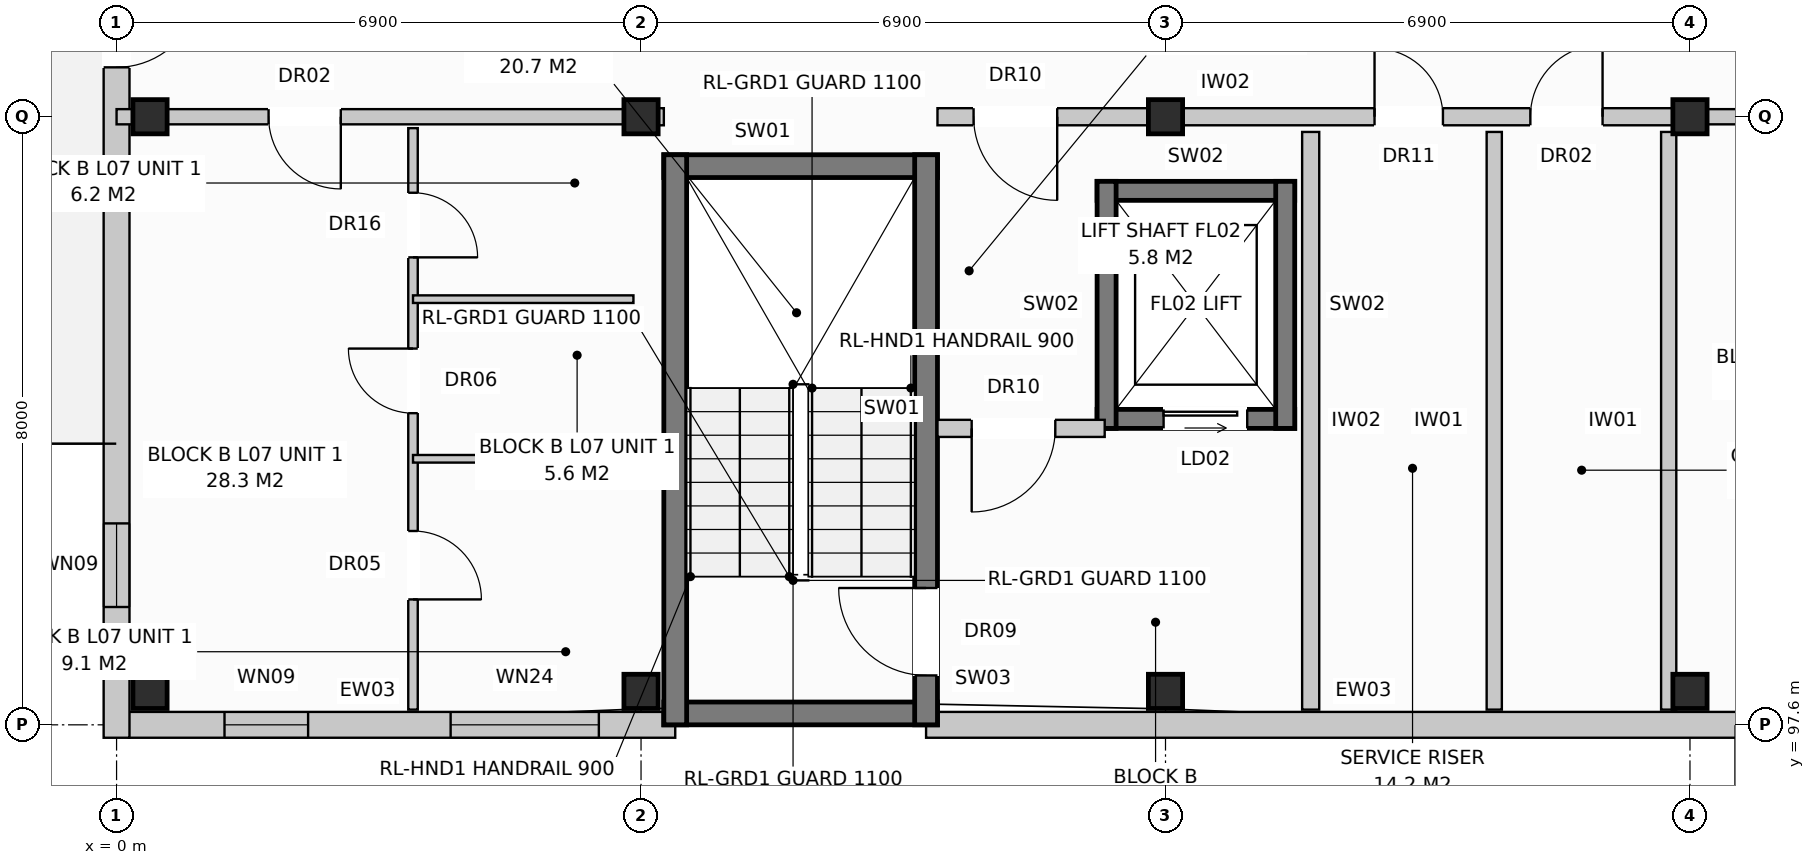
"""IFC4 building model, lengths in metres.
Left out: names, types, materials, properties, quantities, classifications, styles, units other than length and angle.
Written with IfcOpenShell. Run it as: python <this file> out.ifc"""

import sys

from ifc_helpers import new_model, si_unit, direction, frame, frame_2d, origin, origin_with_axes, origin_2d, place, context, subcontext, project, spatial, rectangle, extrude, element, fill, save


model = new_model("IFC4")
c1 = context("Model", 3, precision=1e-05, world=origin(), true_north=direction((0.0, 1.0)))
c2 = subcontext(c1, "Body", "Model", "MODEL_VIEW")
j1 = project(units=[si_unit("LENGTHUNIT", "METRE"), si_unit("PLANEANGLEUNIT", "RADIAN")], contexts=[c1])
p1 = place(None, origin())
s1 = spatial("IfcSite", under=j1, at=p1, CompositionType="ELEMENT")
p2 = place(p1, origin())
s2 = spatial("IfcBuilding", under=s1, at=p2, CompositionType="ELEMENT")
p3 = place(p2, frame((0.0, 0.0, 24.0)))
s3 = spatial("IfcBuildingStorey", under=s2, at=p3, CompositionType="ELEMENT", Elevation=24.0)
for number, where, z_axis, x_axis in (
    (1, (0.44, 98.04, 0.0), (0.0, 0.0, 1.0), (1.0, 0.0, 0.0)),
    (2, (0.44, 105.6, 0.0), (0.0, 0.0, 1.0), (1.0, 0.0, 0.0)),
    (3, (6.9, 98.04, 0.0), (0.0, 0.0, 1.0), (1.0, 0.0, 0.0)),
    (4, (6.9, 105.6, 0.0), (0.0, 0.0, 1.0), (1.0, 0.0, 0.0)),
    (5, (13.8, 98.04, 0.0), (0.0, 0.0, 1.0), (1.0, 0.0, 0.0)),
    (6, (13.8, 105.6, 0.0), (0.0, 0.0, 1.0), (1.0, 0.0, 0.0)),
    (7, (20.7, 98.04, 0.0), (0.0, 0.0, 1.0), (1.0, 0.0, 0.0)),
    (8, (20.7, 105.6, 0.0), (0.0, 0.0, 1.0), (1.0, 0.0, 0.0)),
):
    element("IfcColumn", number, at=place(p3, frame(where, z_axis=z_axis, x_axis=x_axis)), inside=s3, PredefinedType="COLUMN", context=c2, shape_type="SweptSolid", body=[
        extrude(rectangle(XDim=0.45, YDim=0.45, at=origin_2d()), origin(), (0.0, 0.0, 1.0), 3.2),
    ])
p4 = place(p3, frame((0.16, 97.6, 0.0), z_axis=(0.0, 0.0, 1.0), x_axis=(1.0, 0.0, 0.0)))
e9 = element("IfcWall", 9, at=p4, inside=s3, PredefinedType="STANDARD", context=c2, shape_type="SweptSolid", body=[
    extrude(rectangle(XDim=7.19, YDim=0.34, at=frame_2d((3.595, 0.0))), origin(), (0.0, 0.0, 1.0), 2.95),
])
p5 = place(p4, frame((1.26, 0.0, 0.72)))
e10 = element("IfcOpeningElement", 10, at=p5, cuts=e9, PredefinedType="OPENING", context=c2, shape_type="SweptSolid", body=[
    extrude(rectangle(XDim=1.1, YDim=1.5, at=frame_2d((0.55, 0.75))), frame((0.0, 0.182, 0.0), z_axis=(0.0, -1.0, 0.0), x_axis=(1.0, 0.0, 0.0)), (0.0, 0.0, 1.0), 0.364),
])
p6 = place(p4, frame((4.235, 0.0, 0.8)))
e11 = element("IfcOpeningElement", 11, at=p6, cuts=e9, PredefinedType="OPENING", context=c2, shape_type="SweptSolid", body=[
    extrude(rectangle(XDim=1.95, YDim=1.65, at=frame_2d((0.975, 0.825))), frame((0.0, 0.182, 0.0), z_axis=(0.0, -1.0, 0.0), x_axis=(1.0, 0.0, 0.0)), (0.0, 0.0, 1.0), 0.364),
])
p7 = place(p3, frame((10.65, 97.6, 0.0), z_axis=(0.0, 0.0, 1.0), x_axis=(1.0, 0.0, 0.0)))
e12 = element("IfcWall", 12, at=p7, inside=s3, PredefinedType="STANDARD", context=c2, shape_type="SweptSolid", body=[
    extrude(rectangle(XDim=17.4, YDim=0.34, at=frame_2d((8.7, 0.0))), origin(), (0.0, 0.0, 1.0), 2.95),
])
p8 = place(p7, frame((11.82, 0.0, 0.0)))
e13 = element("IfcOpeningElement", 13, at=p8, cuts=e12, PredefinedType="OPENING", context=c2, shape_type="SweptSolid", body=[
    extrude(rectangle(XDim=1.05, YDim=2.12, at=frame_2d((0.525, 1.06))), frame((0.0, 0.182, 0.0), z_axis=(0.0, -1.0, 0.0), x_axis=(1.0, 0.0, 0.0)), (0.0, 0.0, 1.0), 0.364),
])
p9 = place(p7, frame((14.97, 0.0, 0.72)))
e14 = element("IfcOpeningElement", 14, at=p9, cuts=e12, PredefinedType="OPENING", context=c2, shape_type="SweptSolid", body=[
    extrude(rectangle(XDim=1.1, YDim=1.5, at=frame_2d((0.55, 0.75))), frame((0.0, 0.182, 0.0), z_axis=(0.0, -1.0, 0.0), x_axis=(1.0, 0.0, 0.0)), (0.0, 0.0, 1.0), 0.364),
])
p10 = place(p3, frame((0.0, 97.43, 0.0), z_axis=(0.0, 0.0, 1.0), x_axis=(0.0, 1.0, 0.0)))
e15 = element("IfcWall", 15, at=p10, inside=s3, PredefinedType="STANDARD", context=c2, shape_type="SweptSolid", body=[
    extrude(rectangle(XDim=18.74, YDim=0.34, at=frame_2d((9.37, 0.0))), origin(), (0.0, 0.0, 1.0), 2.95),
])
p11 = place(p10, frame((8.82, 0.0, 0.0)))
e16 = element("IfcOpeningElement", 16, at=p11, cuts=e15, PredefinedType="OPENING", context=c2, shape_type="SweptSolid", body=[
    extrude(rectangle(XDim=1.1, YDim=2.1, at=frame_2d((0.55, 1.05))), frame((0.0, 0.182, 0.0), z_axis=(0.0, -1.0, 0.0), x_axis=(1.0, 0.0, 0.0)), (0.0, 0.0, 1.0), 0.364),
])
p12 = place(p10, frame((1.72, 0.0, 0.72)))
e17 = element("IfcOpeningElement", 17, at=p12, cuts=e15, PredefinedType="OPENING", context=c2, shape_type="SweptSolid", body=[
    extrude(rectangle(XDim=1.1, YDim=1.5, at=frame_2d((0.55, 0.75))), frame((0.0, 0.182, 0.0), z_axis=(0.0, -1.0, 0.0), x_axis=(1.0, 0.0, 0.0)), (0.0, 0.0, 1.0), 0.364),
])
p13 = place(p10, frame((15.92, 0.0, 0.72)))
e18 = element("IfcOpeningElement", 18, at=p13, cuts=e15, PredefinedType="OPENING", context=c2, shape_type="SweptSolid", body=[
    extrude(rectangle(XDim=1.1, YDim=1.5, at=frame_2d((0.55, 0.75))), frame((0.0, 0.182, 0.0), z_axis=(0.0, -1.0, 0.0), x_axis=(1.0, 0.0, 0.0)), (0.0, 0.0, 1.0), 0.364),
])
for number, where, z_axis, x_axis in (
    (19, (7.2, 97.75, 0.0), (0.0, 0.0, 1.0), (1.0, 0.0, 0.0)),
    (20, (7.2, 104.95, 0.0), (0.0, 0.0, 1.0), (1.0, 0.0, 0.0)),
):
    element("IfcWall", number, at=place(p3, frame(where, z_axis=z_axis, x_axis=x_axis)), inside=s3, PredefinedType="SHEAR", context=c2, shape_type="SweptSolid", body=[
        extrude(rectangle(XDim=3.6, YDim=0.3, at=frame_2d((1.8, 0.0))), origin(), (0.0, 0.0, 1.0), 2.95),
    ])
p14 = place(p3, frame((7.35, 97.6, 0.0), z_axis=(0.0, 0.0, 1.0), x_axis=(0.0, 1.0, 0.0)))
e21 = element("IfcWall", 21, at=p14, inside=s3, PredefinedType="SHEAR", context=c2, shape_type="SweptSolid", body=[
    extrude(rectangle(XDim=7.5, YDim=0.3, at=frame_2d((3.75, 0.0))), origin(), (0.0, 0.0, 1.0), 2.95),
])
p15 = place(p3, frame((10.65, 97.6, 0.0), z_axis=(0.0, 0.0, 1.0), x_axis=(0.0, 1.0, 0.0)))
e22 = element("IfcWall", 22, at=p15, inside=s3, PredefinedType="SHEAR", context=c2, shape_type="SweptSolid", body=[
    extrude(rectangle(XDim=7.5, YDim=0.3, at=frame_2d((3.75, 0.0))), origin(), (0.0, 0.0, 1.0), 2.95),
])
p16 = place(p15, frame((0.65, 0.0, 0.0)))
e23 = element("IfcOpeningElement", 23, at=p16, cuts=e22, PredefinedType="OPENING", context=c2, shape_type="SweptSolid", body=[
    extrude(rectangle(XDim=1.15, YDim=2.15, at=frame_2d((0.575, 1.075))), frame((0.0, 0.162, 0.0), z_axis=(0.0, -1.0, 0.0), x_axis=(1.0, 0.0, 0.0)), (0.0, 0.0, 1.0), 0.324),
])
p17 = place(p3, frame((12.9, 101.625, 0.0), z_axis=(0.0, 0.0, 1.0), x_axis=(1.0, 0.0, 0.0)))
e24 = element("IfcWall", 24, at=p17, inside=s3, PredefinedType="SHEAR", context=c2, shape_type="SweptSolid", body=[
    extrude(rectangle(XDim=2.6, YDim=0.25, at=frame_2d((1.3, 0.0))), origin(), (0.0, 0.0, 1.0), 2.95),
])
p18 = place(p17, frame((0.875, 0.0, 0.0)))
e25 = element("IfcOpeningElement", 25, at=p18, cuts=e24, PredefinedType="OPENING", context=c2, shape_type="SweptSolid", body=[
    extrude(rectangle(XDim=1.1, YDim=2.1, at=frame_2d((0.55, 1.05))), frame((0.0, 0.137, 0.0), z_axis=(0.0, -1.0, 0.0), x_axis=(1.0, 0.0, 0.0)), (0.0, 0.0, 1.0), 0.274),
])
p19 = place(p3, frame((12.9, 104.625, 0.0), z_axis=(0.0, 0.0, 1.0), x_axis=(1.0, 0.0, 0.0)))
e26 = element("IfcWall", 26, at=p19, inside=s3, PredefinedType="SHEAR", context=c2, shape_type="SweptSolid", body=[
    extrude(rectangle(XDim=2.6, YDim=0.25, at=frame_2d((1.3, 0.0))), origin(), (0.0, 0.0, 1.0), 2.95),
])
for number, where, z_axis, x_axis in (
    (27, (13.025, 101.5, 0.0), (0.0, 0.0, 1.0), (0.0, 1.0, 0.0)),
    (28, (15.375, 101.5, 0.0), (0.0, 0.0, 1.0), (0.0, 1.0, 0.0)),
):
    element("IfcWall", number, at=place(p3, frame(where, z_axis=z_axis, x_axis=x_axis)), inside=s3, PredefinedType="SHEAR", context=c2, shape_type="SweptSolid", body=[
        extrude(rectangle(XDim=3.25, YDim=0.25, at=frame_2d((1.625, 0.0))), origin(), (0.0, 0.0, 1.0), 2.95),
    ])
p20 = place(p3, frame((15.71, 97.8, 0.0), z_axis=(0.0, 0.0, 1.0), x_axis=(0.0, 1.0, 0.0)))
e29 = element("IfcWall", 29, at=p20, inside=s3, PredefinedType="PARTITIONING", context=c2, shape_type="SweptSolid", body=[
    extrude(rectangle(XDim=7.6, YDim=0.225, at=frame_2d((3.8, 0.0))), origin(), (0.0, 0.0, 1.0), 2.59),
])
p21 = place(p3, frame((10.8, 101.5, 0.0), z_axis=(0.0, 0.0, 1.0), x_axis=(1.0, 0.0, 0.0)))
e30 = element("IfcWall", 30, at=p21, inside=s3, PredefinedType="PARTITIONING", context=c2, shape_type="SweptSolid", body=[
    extrude(rectangle(XDim=2.2, YDim=0.225, at=frame_2d((1.1, 0.0))), origin(), (0.0, 0.0, 1.0), 2.95),
])
p22 = place(p21, frame((0.45, 0.0, 0.0)))
e31 = element("IfcOpeningElement", 31, at=p22, cuts=e30, PredefinedType="OPENING", context=c2, shape_type="SweptSolid", body=[
    extrude(rectangle(XDim=1.1, YDim=2.15, at=frame_2d((0.55, 1.075))), frame((0.0, 0.125, 0.0), z_axis=(0.0, -1.0, 0.0), x_axis=(1.0, 0.0, 0.0)), (0.0, 0.0, 1.0), 0.249),
])
p23 = place(p3, frame((6.9, 105.6, 0.0), z_axis=(0.0, 0.0, 1.0), x_axis=(1.0, 0.0, 0.0)))
e32 = element("IfcWall", 32, at=p23, inside=s3, PredefinedType="PARTITIONING", context=c2, shape_type="SweptSolid", body=[
    extrude(rectangle(XDim=0.3, YDim=0.225, at=frame_2d((0.15, 0.0))), origin(), (0.0, 0.0, 1.0), 2.95),
])
for number, where, z_axis, x_axis in (
    (33, (18.125, 97.8, 0.0), (0.0, 0.0, 1.0), (0.0, 1.0, 0.0)),
    (34, (20.42, 97.8, 0.0), (0.0, 0.0, 1.0), (0.0, 1.0, 0.0)),
):
    element("IfcWall", number, at=place(p3, frame(where, z_axis=z_axis, x_axis=x_axis)), inside=s3, PredefinedType="PARTITIONING", context=c2, shape_type="SweptSolid", body=[
        extrude(rectangle(XDim=7.6, YDim=0.2, at=frame_2d((3.8, 0.0))), origin(), (0.0, 0.0, 1.0), 2.95),
    ])
p24 = place(p3, frame((10.8, 105.6, 0.0), z_axis=(0.0, 0.0, 1.0), x_axis=(1.0, 0.0, 0.0)))
e35 = element("IfcWall", 35, at=p24, inside=s3, PredefinedType="PARTITIONING", context=c2, shape_type="SweptSolid", body=[
    extrude(rectangle(XDim=9.9, YDim=0.225, at=frame_2d((4.95, 0.0))), origin(), (0.0, 0.0, 1.0), 2.39),
])
p25 = place(p24, frame((0.475, 0.0, 0.0)))
e36 = element("IfcOpeningElement", 36, at=p25, cuts=e35, PredefinedType="OPENING", context=c2, shape_type="SweptSolid", body=[
    extrude(rectangle(XDim=1.1, YDim=2.15, at=frame_2d((0.55, 1.075))), frame((0.0, 0.125, 0.0), z_axis=(0.0, -1.0, 0.0), x_axis=(1.0, 0.0, 0.0)), (0.0, 0.0, 1.0), 0.249),
])
p26 = place(p24, frame((5.75, 0.0, 0.0)))
e37 = element("IfcOpeningElement", 37, at=p26, cuts=e35, PredefinedType="OPENING", context=c2, shape_type="SweptSolid", body=[
    extrude(rectangle(XDim=0.9, YDim=2.1, at=frame_2d((0.45, 1.05))), frame((0.0, 0.125, 0.0), z_axis=(0.0, -1.0, 0.0), x_axis=(1.0, 0.0, 0.0)), (0.0, 0.0, 1.0), 0.249),
])
p27 = place(p24, frame((7.8, 0.0, 0.0)))
e38 = element("IfcOpeningElement", 38, at=p27, cuts=e35, PredefinedType="OPENING", context=c2, shape_type="SweptSolid", body=[
    extrude(rectangle(XDim=0.95, YDim=2.15, at=frame_2d((0.475, 1.075))), frame((0.0, 0.125, 0.0), z_axis=(0.0, -1.0, 0.0), x_axis=(1.0, 0.0, 0.0)), (0.0, 0.0, 1.0), 0.249),
])
p28 = place(p3, frame((0.0, 105.6, 0.0), z_axis=(0.0, 0.0, 1.0), x_axis=(1.0, 0.0, 0.0)))
e39 = element("IfcWall", 39, at=p28, inside=s3, PredefinedType="PARTITIONING", context=c2, shape_type="SweptSolid", body=[
    extrude(rectangle(XDim=6.9, YDim=0.2, at=frame_2d((3.45, 0.0))), origin(), (0.0, 0.0, 1.0), 2.39),
])
p29 = place(p28, frame((2.0, 0.0, 0.0)))
e40 = element("IfcOpeningElement", 40, at=p29, cuts=e39, PredefinedType="OPENING", context=c2, shape_type="SweptSolid", body=[
    extrude(rectangle(XDim=0.95, YDim=2.15, at=frame_2d((0.475, 1.075))), frame((0.0, 0.112, 0.0), z_axis=(0.0, -1.0, 0.0), x_axis=(1.0, 0.0, 0.0)), (0.0, 0.0, 1.0), 0.224),
])
p30 = place(p3, frame((3.9, 105.45, 0.0), z_axis=(0.0, 0.0, 1.0), x_axis=(0.0, -1.0, 0.0)))
e41 = element("IfcWall", 41, at=p30, inside=s3, PredefinedType="PARTITIONING", context=c2, shape_type="SweptSolid", body=[
    extrude(rectangle(XDim=7.65, YDim=0.125, at=frame_2d((3.825, 0.0))), origin(), (0.0, 0.0, 1.0), 2.95),
])
p31 = place(p30, frame((0.85, 0.0, 0.0)))
e42 = element("IfcOpeningElement", 42, at=p31, cuts=e41, PredefinedType="OPENING", context=c2, shape_type="SweptSolid", body=[
    extrude(rectangle(XDim=0.85, YDim=2.1, at=frame_2d((0.425, 1.05))), frame((0.0, 0.074, 0.0), z_axis=(0.0, -1.0, 0.0), x_axis=(1.0, 0.0, 0.0)), (0.0, 0.0, 1.0), 0.149),
])
p32 = place(p30, frame((2.9, 0.0, 0.0)))
e43 = element("IfcOpeningElement", 43, at=p32, cuts=e41, PredefinedType="OPENING", context=c2, shape_type="SweptSolid", body=[
    extrude(rectangle(XDim=0.85, YDim=2.05, at=frame_2d((0.425, 1.025))), frame((0.0, 0.074, 0.0), z_axis=(0.0, -1.0, 0.0), x_axis=(1.0, 0.0, 0.0)), (0.0, 0.0, 1.0), 0.149),
])
p33 = place(p30, frame((5.3, 0.0, 0.0)))
e44 = element("IfcOpeningElement", 44, at=p33, cuts=e41, PredefinedType="OPENING", context=c2, shape_type="SweptSolid", body=[
    extrude(rectangle(XDim=0.9, YDim=2.1, at=frame_2d((0.45, 1.05))), frame((0.0, 0.074, 0.0), z_axis=(0.0, -1.0, 0.0), x_axis=(1.0, 0.0, 0.0)), (0.0, 0.0, 1.0), 0.149),
])
for number, where, z_axis, x_axis in (
    (45, (3.9, 103.2, 0.0), (0.0, 0.0, 1.0), (1.0, 0.0, 0.0)),
    (46, (3.9, 101.1, 0.0), (0.0, 0.0, 1.0), (1.0, 0.0, 0.0)),
):
    element("IfcWall", number, at=place(p3, frame(where, z_axis=z_axis, x_axis=x_axis)), inside=s3, PredefinedType="PARTITIONING", context=c2, shape_type="SweptSolid", body=[
        extrude(rectangle(XDim=2.9, YDim=0.1, at=frame_2d((1.45, 0.0))), origin(), (0.0, 0.0, 1.0), 2.95),
    ])
p34 = place(p3, frame((20.7, 105.6, 0.0), z_axis=(0.0, 0.0, 1.0), x_axis=(1.0, 0.0, 0.0)))
e47 = element("IfcWall", 47, at=p34, inside=s3, PredefinedType="PARTITIONING", context=c2, shape_type="SweptSolid", body=[
    extrude(rectangle(XDim=6.9, YDim=0.2, at=frame_2d((3.45, 0.0))), origin(), (0.0, 0.0, 1.0), 2.39),
])
p35 = place(p34, frame((2.0, 0.0, 0.0)))
e48 = element("IfcOpeningElement", 48, at=p35, cuts=e47, PredefinedType="OPENING", context=c2, shape_type="SweptSolid", body=[
    extrude(rectangle(XDim=0.95, YDim=2.15, at=frame_2d((0.475, 1.075))), frame((0.0, 0.112, 0.0), z_axis=(0.0, -1.0, 0.0), x_axis=(1.0, 0.0, 0.0)), (0.0, 0.0, 1.0), 0.224),
])
p36 = place(p5, origin_with_axes())
e49 = element("IfcWindow", 49, at=p36, inside=s3, PartitioningType="SINGLE_PANEL", PredefinedType="WINDOW", context=c2, shape_type="SweptSolid", body=[
    extrude(rectangle(XDim=1.1, YDim=1.5, at=frame_2d((0.55, 0.75))), frame((0.0, 0.03, 0.0), z_axis=(0.0, -1.0, 0.0), x_axis=(1.0, 0.0, 0.0)), (0.0, 0.0, 1.0), 0.06),
])
fill(e10, e49)
p37 = place(p6, origin_with_axes())
e50 = element("IfcWindow", 50, at=p37, inside=s3, PartitioningType="SINGLE_PANEL", PredefinedType="WINDOW", context=c2, shape_type="SweptSolid", body=[
    extrude(rectangle(XDim=1.95, YDim=1.65, at=frame_2d((0.975, 0.825))), frame((0.0, 0.03, 0.0), z_axis=(0.0, -1.0, 0.0), x_axis=(1.0, 0.0, 0.0)), (0.0, 0.0, 1.0), 0.06),
])
fill(e11, e50)
p38 = place(p11, frame((1.1, 0.0, 0.0), z_axis=(0.0, 0.0, 1.0), x_axis=(-1.0, 0.0, 0.0)))
e51 = element("IfcDoor", 51, at=p38, inside=s3, OperationType="SINGLE_SWING_RIGHT", PredefinedType="DOOR", context=c2, shape_type="SweptSolid", body=[
    extrude(rectangle(XDim=1.1, YDim=2.1, at=frame_2d((0.55, 1.05))), frame((0.0, 0.025, 0.0), z_axis=(0.0, -1.0, 0.0), x_axis=(1.0, 0.0, 0.0)), (0.0, 0.0, 1.0), 0.05),
])
fill(e16, e51)
p39 = place(p12, origin_with_axes())
e52 = element("IfcWindow", 52, at=p39, inside=s3, PartitioningType="SINGLE_PANEL", PredefinedType="WINDOW", context=c2, shape_type="SweptSolid", body=[
    extrude(rectangle(XDim=1.1, YDim=1.5, at=frame_2d((0.55, 0.75))), frame((0.0, 0.03, 0.0), z_axis=(0.0, -1.0, 0.0), x_axis=(1.0, 0.0, 0.0)), (0.0, 0.0, 1.0), 0.06),
])
fill(e17, e52)
p40 = place(p16, origin_with_axes())
e53 = element("IfcDoor", 53, at=p40, inside=s3, OperationType="SINGLE_SWING_RIGHT", PredefinedType="DOOR", context=c2, shape_type="SweptSolid", body=[
    extrude(rectangle(XDim=1.15, YDim=2.15, at=frame_2d((0.575, 1.075))), frame((0.0, 0.025, 0.0), z_axis=(0.0, -1.0, 0.0), x_axis=(1.0, 0.0, 0.0)), (0.0, 0.0, 1.0), 0.05),
])
fill(e23, e53)
p41 = place(p18, origin_with_axes())
e54 = element("IfcDoor", 54, at=p41, inside=s3, OperationType="SLIDING_TO_LEFT", PredefinedType="DOOR", context=c2, shape_type="SweptSolid", body=[
    extrude(rectangle(XDim=1.1, YDim=2.1, at=frame_2d((0.55, 1.05))), frame((0.0, 0.025, 0.0), z_axis=(0.0, -1.0, 0.0), x_axis=(1.0, 0.0, 0.0)), (0.0, 0.0, 1.0), 0.05),
])
fill(e25, e54)
p42 = place(p22, frame((1.1, 0.0, 0.0), z_axis=(0.0, 0.0, 1.0), x_axis=(-1.0, 0.0, 0.0)))
e55 = element("IfcDoor", 55, at=p42, inside=s3, OperationType="SINGLE_SWING_LEFT", PredefinedType="DOOR", context=c2, shape_type="SweptSolid", body=[
    extrude(rectangle(XDim=1.1, YDim=2.15, at=frame_2d((0.55, 1.075))), frame((0.0, 0.025, 0.0), z_axis=(0.0, -1.0, 0.0), x_axis=(1.0, 0.0, 0.0)), (0.0, 0.0, 1.0), 0.05),
])
fill(e31, e55)
p43 = place(p25, frame((1.1, 0.0, 0.0), z_axis=(0.0, 0.0, 1.0), x_axis=(-1.0, 0.0, 0.0)))
e56 = element("IfcDoor", 56, at=p43, inside=s3, OperationType="SINGLE_SWING_RIGHT", PredefinedType="DOOR", context=c2, shape_type="SweptSolid", body=[
    extrude(rectangle(XDim=1.1, YDim=2.15, at=frame_2d((0.55, 1.075))), frame((0.0, 0.025, 0.0), z_axis=(0.0, -1.0, 0.0), x_axis=(1.0, 0.0, 0.0)), (0.0, 0.0, 1.0), 0.05),
])
fill(e36, e56)
p44 = place(p26, origin_with_axes())
e57 = element("IfcDoor", 57, at=p44, inside=s3, OperationType="SINGLE_SWING_LEFT", PredefinedType="DOOR", context=c2, shape_type="SweptSolid", body=[
    extrude(rectangle(XDim=0.9, YDim=2.1, at=frame_2d((0.45, 1.05))), frame((0.0, 0.025, 0.0), z_axis=(0.0, -1.0, 0.0), x_axis=(1.0, 0.0, 0.0)), (0.0, 0.0, 1.0), 0.05),
])
fill(e37, e57)
p45 = place(p27, origin_with_axes())
e58 = element("IfcDoor", 58, at=p45, inside=s3, OperationType="SINGLE_SWING_RIGHT", PredefinedType="DOOR", context=c2, shape_type="SweptSolid", body=[
    extrude(rectangle(XDim=0.95, YDim=2.15, at=frame_2d((0.475, 1.075))), frame((0.0, 0.025, 0.0), z_axis=(0.0, -1.0, 0.0), x_axis=(1.0, 0.0, 0.0)), (0.0, 0.0, 1.0), 0.05),
])
fill(e38, e58)
p46 = place(p29, frame((0.95, 0.0, 0.0), z_axis=(0.0, 0.0, 1.0), x_axis=(-1.0, 0.0, 0.0)))
e59 = element("IfcDoor", 59, at=p46, inside=s3, OperationType="SINGLE_SWING_RIGHT", PredefinedType="DOOR", context=c2, shape_type="SweptSolid", body=[
    extrude(rectangle(XDim=0.95, YDim=2.15, at=frame_2d((0.475, 1.075))), frame((0.0, 0.025, 0.0), z_axis=(0.0, -1.0, 0.0), x_axis=(1.0, 0.0, 0.0)), (0.0, 0.0, 1.0), 0.05),
])
fill(e40, e59)
p47 = place(p31, origin_with_axes())
e60 = element("IfcDoor", 60, at=p47, inside=s3, OperationType="SINGLE_SWING_RIGHT", PredefinedType="DOOR", context=c2, shape_type="SweptSolid", body=[
    extrude(rectangle(XDim=0.85, YDim=2.1, at=frame_2d((0.425, 1.05))), frame((0.0, 0.025, 0.0), z_axis=(0.0, -1.0, 0.0), x_axis=(1.0, 0.0, 0.0)), (0.0, 0.0, 1.0), 0.05),
])
fill(e42, e60)
p48 = place(p32, frame((0.85, 0.0, 0.0), z_axis=(0.0, 0.0, 1.0), x_axis=(-1.0, 0.0, 0.0)))
e61 = element("IfcDoor", 61, at=p48, inside=s3, OperationType="SINGLE_SWING_LEFT", PredefinedType="DOOR", context=c2, shape_type="SweptSolid", body=[
    extrude(rectangle(XDim=0.85, YDim=2.05, at=frame_2d((0.425, 1.025))), frame((0.0, 0.025, 0.0), z_axis=(0.0, -1.0, 0.0), x_axis=(1.0, 0.0, 0.0)), (0.0, 0.0, 1.0), 0.05),
])
fill(e43, e61)
p49 = place(p33, origin_with_axes())
e62 = element("IfcDoor", 62, at=p49, inside=s3, OperationType="SINGLE_SWING_RIGHT", PredefinedType="DOOR", context=c2, shape_type="SweptSolid", body=[
    extrude(rectangle(XDim=0.9, YDim=2.1, at=frame_2d((0.45, 1.05))), frame((0.0, 0.025, 0.0), z_axis=(0.0, -1.0, 0.0), x_axis=(1.0, 0.0, 0.0)), (0.0, 0.0, 1.0), 0.05),
])
fill(e44, e62)
save(model, sys.argv[1])
